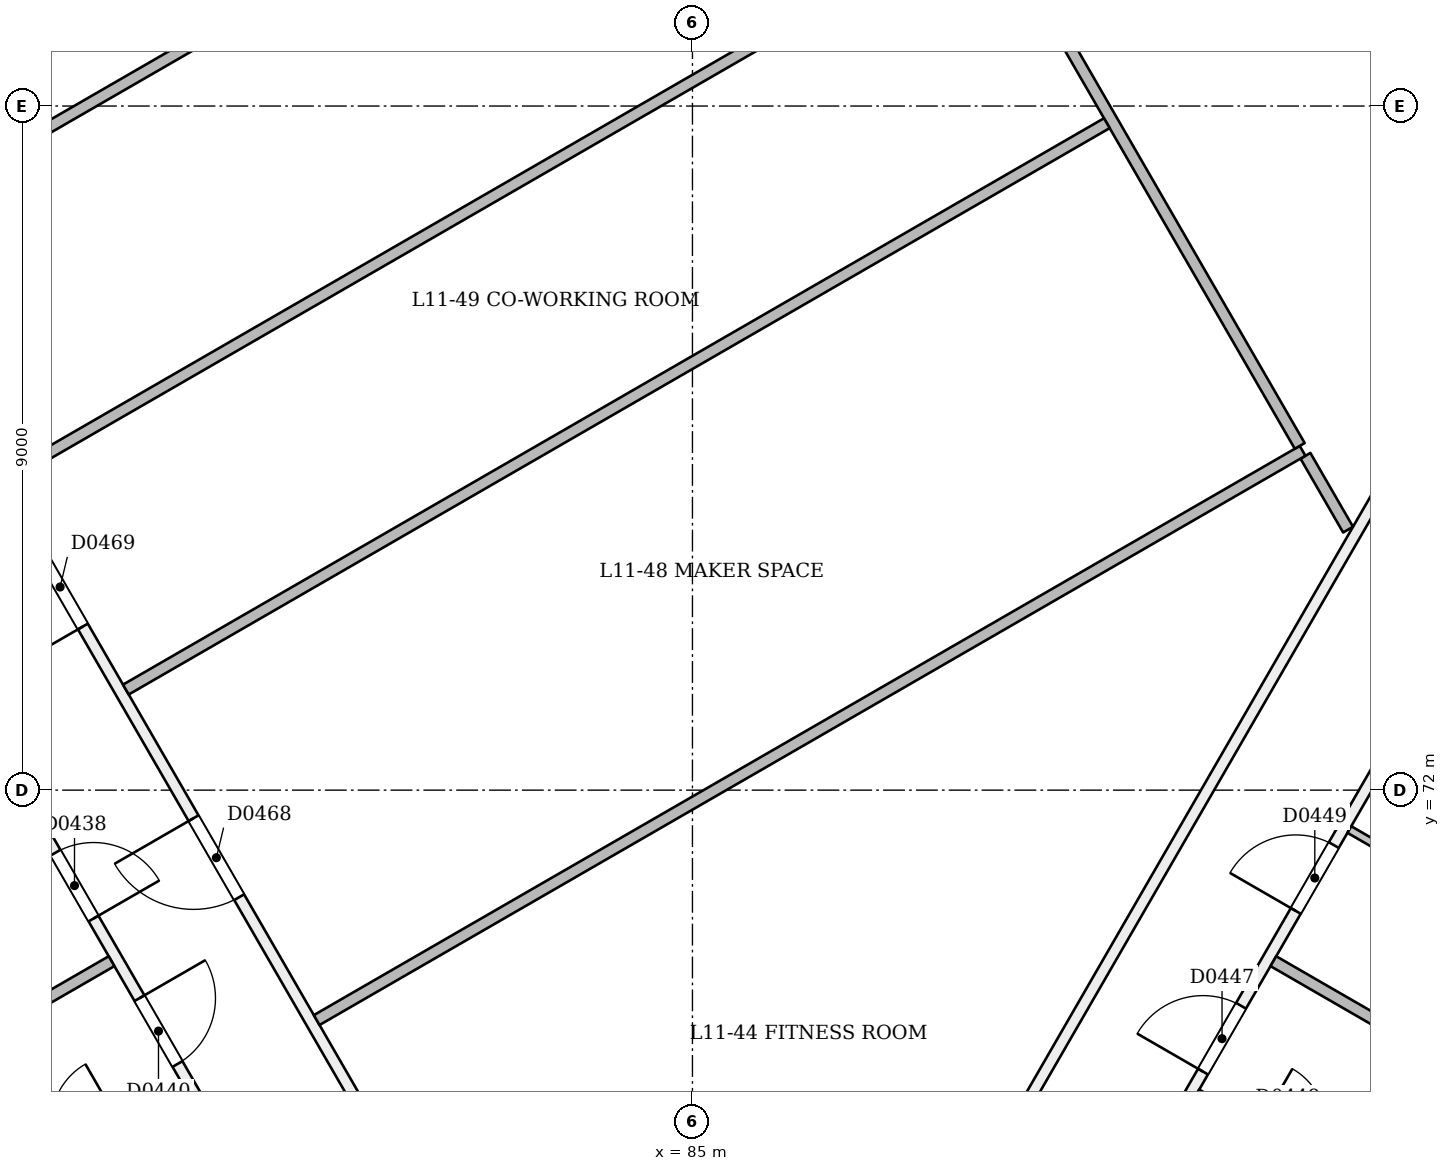
"""IFC4 building model, lengths in metres.
Left out: names, types, materials, properties, quantities, classifications, styles, units other than length and angle.
Written with IfcOpenShell. Run it as: python <this file> out.ifc"""

import sys

from ifc_helpers import new_model, si_unit, direction, frame, frame_2d, origin, place, context, subcontext, project, spatial, rectangle, extrude, element, fill, save


model = new_model("IFC4")
c1 = context("Model", 3, precision=1e-05, world=origin(), true_north=direction((0.0, 1.0)))
c2 = subcontext(c1, "Body", "Model", "MODEL_VIEW")
j1 = project(units=[si_unit("LENGTHUNIT", "METRE"), si_unit("PLANEANGLEUNIT", "RADIAN")], contexts=[c1])
p1 = place(None, origin())
s1 = spatial("IfcSite", under=j1, at=p1, CompositionType="ELEMENT")
p2 = place(p1, origin())
s2 = spatial("IfcBuilding", under=s1, at=p2, CompositionType="ELEMENT")
p3 = place(p2, frame((0.0, 0.0, 48.6)))
s3 = spatial("IfcBuildingStorey", under=s2, at=p3, CompositionType="ELEMENT", Elevation=48.6)
p4 = place(p3, frame((63.923, 93.17, 0.0), z_axis=(0.0, 0.0, 1.0), x_axis=(0.500002225217, -0.866024119051, 0.0)))
e1 = element("IfcWall", 1, at=p4, inside=s3, PredefinedType="PARTITIONING", context=c2, shape_type="SweptSolid", body=[
    extrude(rectangle(XDim=38.6, YDim=0.15, at=frame_2d((19.3, 0.0))), origin(), (0.0, 0.0, 1.0), 2.7),
])
p5 = place(p4, frame((0.605, 0.0, 0.0)))
e2 = element("IfcOpeningElement", 2, at=p5, cuts=e1, PredefinedType="OPENING", context=c2, shape_type="SweptSolid", body=[
    extrude(rectangle(XDim=1.0, YDim=2.1, at=frame_2d((0.5, 1.05))), frame((0.0, 0.085, 0.0), z_axis=(0.0, -1.0, 0.0), x_axis=(1.0, 0.0, 0.0)), (0.0, 0.0, 1.0), 0.171),
])
p6 = place(p4, frame((7.28, 0.0, 0.0)))
e3 = element("IfcOpeningElement", 3, at=p6, cuts=e1, PredefinedType="OPENING", context=c2, shape_type="SweptSolid", body=[
    extrude(rectangle(XDim=1.0, YDim=2.1, at=frame_2d((0.5, 1.05))), frame((0.0, 0.085, 0.0), z_axis=(0.0, -1.0, 0.0), x_axis=(1.0, 0.0, 0.0)), (0.0, 0.0, 1.0), 0.171),
])
p7 = place(p4, frame((9.72, 0.0, 0.0)))
e4 = element("IfcOpeningElement", 4, at=p7, cuts=e1, PredefinedType="OPENING", context=c2, shape_type="SweptSolid", body=[
    extrude(rectangle(XDim=1.0, YDim=2.1, at=frame_2d((0.5, 1.05))), frame((0.0, 0.085, 0.0), z_axis=(0.0, -1.0, 0.0), x_axis=(1.0, 0.0, 0.0)), (0.0, 0.0, 1.0), 0.171),
])
p8 = place(p4, frame((16.395, 0.0, 0.0)))
e5 = element("IfcOpeningElement", 5, at=p8, cuts=e1, PredefinedType="OPENING", context=c2, shape_type="SweptSolid", body=[
    extrude(rectangle(XDim=1.0, YDim=2.1, at=frame_2d((0.5, 1.05))), frame((0.0, 0.085, 0.0), z_axis=(0.0, -1.0, 0.0), x_axis=(1.0, 0.0, 0.0)), (0.0, 0.0, 1.0), 0.171),
])
p9 = place(p4, frame((18.72, 0.0, 0.0)))
e6 = element("IfcOpeningElement", 6, at=p9, cuts=e1, PredefinedType="OPENING", context=c2, shape_type="SweptSolid", body=[
    extrude(rectangle(XDim=1.0, YDim=2.1, at=frame_2d((0.5, 1.05))), frame((0.0, 0.085, 0.0), z_axis=(0.0, -1.0, 0.0), x_axis=(1.0, 0.0, 0.0)), (0.0, 0.0, 1.0), 0.171),
])
p10 = place(p4, frame((25.395, 0.0, 0.0)))
e7 = element("IfcOpeningElement", 7, at=p10, cuts=e1, PredefinedType="OPENING", context=c2, shape_type="SweptSolid", body=[
    extrude(rectangle(XDim=1.0, YDim=2.1, at=frame_2d((0.5, 1.05))), frame((0.0, 0.085, 0.0), z_axis=(0.0, -1.0, 0.0), x_axis=(1.0, 0.0, 0.0)), (0.0, 0.0, 1.0), 0.171),
])
p11 = place(p4, frame((27.605, 0.0, 0.0)))
e8 = element("IfcOpeningElement", 8, at=p11, cuts=e1, PredefinedType="OPENING", context=c2, shape_type="SweptSolid", body=[
    extrude(rectangle(XDim=1.0, YDim=2.1, at=frame_2d((0.5, 1.05))), frame((0.0, 0.085, 0.0), z_axis=(0.0, -1.0, 0.0), x_axis=(1.0, 0.0, 0.0)), (0.0, 0.0, 1.0), 0.171),
])
p12 = place(p4, frame((34.28, 0.0, 0.0)))
e9 = element("IfcOpeningElement", 9, at=p12, cuts=e1, PredefinedType="OPENING", context=c2, shape_type="SweptSolid", body=[
    extrude(rectangle(XDim=1.0, YDim=2.1, at=frame_2d((0.5, 1.05))), frame((0.0, 0.085, 0.0), z_axis=(0.0, -1.0, 0.0), x_axis=(1.0, 0.0, 0.0)), (0.0, 0.0, 1.0), 0.171),
])
p13 = place(p4, frame((37.342, 0.0, 0.0)))
e10 = element("IfcOpeningElement", 10, at=p13, cuts=e1, PredefinedType="OPENING", context=c2, shape_type="SweptSolid", body=[
    extrude(rectangle(XDim=1.0, YDim=2.1, at=frame_2d((0.5, 1.05))), frame((0.0, 0.085, 0.0), z_axis=(0.0, -1.0, 0.0), x_axis=(1.0, 0.0, 0.0)), (0.0, 0.0, 1.0), 0.171),
])
p14 = place(p3, frame((86.109, 58.583, 0.0), z_axis=(0.0, 0.0, 1.0), x_axis=(0.499999734377, 0.866025557142, 0.0)))
e11 = element("IfcWall", 11, at=p14, inside=s3, PredefinedType="PARTITIONING", context=c2, shape_type="SweptSolid", body=[
    extrude(rectangle(XDim=39.938, YDim=0.15, at=frame_2d((19.969, 0.0))), origin(), (0.0, 0.0, 1.0), 2.7),
])
p15 = place(p14, frame((3.619, 0.0, 0.0)))
e12 = element("IfcOpeningElement", 12, at=p15, cuts=e11, PredefinedType="OPENING", context=c2, shape_type="SweptSolid", body=[
    extrude(rectangle(XDim=1.2, YDim=2.1, at=frame_2d((0.6, 1.05))), frame((0.0, 0.085, 0.0), z_axis=(0.0, -1.0, 0.0), x_axis=(1.0, 0.0, 0.0)), (0.0, 0.0, 1.0), 0.171),
])
p16 = place(p14, frame((11.217, 0.0, 0.0)))
e13 = element("IfcOpeningElement", 13, at=p16, cuts=e11, PredefinedType="OPENING", context=c2, shape_type="SweptSolid", body=[
    extrude(rectangle(XDim=1.0, YDim=2.1, at=frame_2d((0.5, 1.05))), frame((0.0, 0.085, 0.0), z_axis=(0.0, -1.0, 0.0), x_axis=(1.0, 0.0, 0.0)), (0.0, 0.0, 1.0), 0.171),
])
p17 = place(p14, frame((13.658, 0.0, 0.0)))
e14 = element("IfcOpeningElement", 14, at=p17, cuts=e11, PredefinedType="OPENING", context=c2, shape_type="SweptSolid", body=[
    extrude(rectangle(XDim=1.0, YDim=2.1, at=frame_2d((0.5, 1.05))), frame((0.0, 0.085, 0.0), z_axis=(0.0, -1.0, 0.0), x_axis=(1.0, 0.0, 0.0)), (0.0, 0.0, 1.0), 0.171),
])
p18 = place(p14, frame((20.217, 0.0, 0.0)))
e15 = element("IfcOpeningElement", 15, at=p18, cuts=e11, PredefinedType="OPENING", context=c2, shape_type="SweptSolid", body=[
    extrude(rectangle(XDim=1.0, YDim=2.1, at=frame_2d((0.5, 1.05))), frame((0.0, 0.085, 0.0), z_axis=(0.0, -1.0, 0.0), x_axis=(1.0, 0.0, 0.0)), (0.0, 0.0, 1.0), 0.171),
])
p19 = place(p14, frame((22.658, 0.0, 0.0)))
e16 = element("IfcOpeningElement", 16, at=p19, cuts=e11, PredefinedType="OPENING", context=c2, shape_type="SweptSolid", body=[
    extrude(rectangle(XDim=1.0, YDim=2.1, at=frame_2d((0.5, 1.05))), frame((0.0, 0.085, 0.0), z_axis=(0.0, -1.0, 0.0), x_axis=(1.0, 0.0, 0.0)), (0.0, 0.0, 1.0), 0.171),
])
p20 = place(p14, frame((29.217, 0.0, 0.0)))
e17 = element("IfcOpeningElement", 17, at=p20, cuts=e11, PredefinedType="OPENING", context=c2, shape_type="SweptSolid", body=[
    extrude(rectangle(XDim=1.0, YDim=2.1, at=frame_2d((0.5, 1.05))), frame((0.0, 0.085, 0.0), z_axis=(0.0, -1.0, 0.0), x_axis=(1.0, 0.0, 0.0)), (0.0, 0.0, 1.0), 0.171),
])
p21 = place(p14, frame((31.658, 0.0, 0.0)))
e18 = element("IfcOpeningElement", 18, at=p21, cuts=e11, PredefinedType="OPENING", context=c2, shape_type="SweptSolid", body=[
    extrude(rectangle(XDim=1.0, YDim=2.1, at=frame_2d((0.5, 1.05))), frame((0.0, 0.085, 0.0), z_axis=(0.0, -1.0, 0.0), x_axis=(1.0, 0.0, 0.0)), (0.0, 0.0, 1.0), 0.171),
])
p22 = place(p14, frame((38.217, 0.0, 0.0)))
e19 = element("IfcOpeningElement", 19, at=p22, cuts=e11, PredefinedType="OPENING", context=c2, shape_type="SweptSolid", body=[
    extrude(rectangle(XDim=1.0, YDim=2.1, at=frame_2d((0.5, 1.05))), frame((0.0, 0.085, 0.0), z_axis=(0.0, -1.0, 0.0), x_axis=(1.0, 0.0, 0.0)), (0.0, 0.0, 1.0), 0.171),
])
p23 = place(p3, frame((85.0, 60.262, 0.0), z_axis=(0.0, 0.0, 1.0), x_axis=(-0.499998554739, 0.866026238205, 0.0)))
e20 = element("IfcWall", 20, at=p23, inside=s3, PredefinedType="PARTITIONING", context=c2, shape_type="SweptSolid", body=[
    extrude(rectangle(XDim=35.031, YDim=0.15, at=frame_2d((17.515, 0.0))), origin(), (0.0, 0.0, 1.0), 3.1),
])
p24 = place(p23, frame((6.026, 0.0, 0.0)))
e21 = element("IfcOpeningElement", 21, at=p24, cuts=e20, PredefinedType="OPENING", context=c2, shape_type="SweptSolid", body=[
    extrude(rectangle(XDim=1.2, YDim=2.1, at=frame_2d((0.6, 1.05))), frame((0.0, 0.085, 0.0), z_axis=(0.0, -1.0, 0.0), x_axis=(1.0, 0.0, 0.0)), (0.0, 0.0, 1.0), 0.171),
])
p25 = place(p23, frame((19.295, 0.0, 0.0)))
e22 = element("IfcOpeningElement", 22, at=p25, cuts=e20, PredefinedType="OPENING", context=c2, shape_type="SweptSolid", body=[
    extrude(rectangle(XDim=1.2, YDim=2.1, at=frame_2d((0.6, 1.05))), frame((0.0, 0.085, 0.0), z_axis=(0.0, -1.0, 0.0), x_axis=(1.0, 0.0, 0.0)), (0.0, 0.0, 1.0), 0.171),
])
p26 = place(p23, frame((28.126, 0.0, 0.0)))
e23 = element("IfcOpeningElement", 23, at=p26, cuts=e20, PredefinedType="OPENING", context=c2, shape_type="SweptSolid", body=[
    extrude(rectangle(XDim=1.2, YDim=2.1, at=frame_2d((0.6, 1.05))), frame((0.0, 0.085, 0.0), z_axis=(0.0, -1.0, 0.0), x_axis=(1.0, 0.0, 0.0)), (0.0, 0.0, 1.0), 0.171),
])
p27 = place(p23, frame((11.927, 0.0, 0.0)))
e24 = element("IfcOpeningElement", 24, at=p27, cuts=e20, PredefinedType="OPENING", context=c2, shape_type="SweptSolid", body=[
    extrude(rectangle(XDim=1.2, YDim=2.1, at=frame_2d((0.6, 1.05))), frame((0.0, 0.085, 0.0), z_axis=(0.0, -1.0, 0.0), x_axis=(1.0, 0.0, 0.0)), (0.0, 0.0, 1.0), 0.171),
])
p28 = place(p23, frame((16.039, 0.0, 0.0)))
e25 = element("IfcOpeningElement", 25, at=p28, cuts=e20, PredefinedType="OPENING", context=c2, shape_type="SweptSolid", body=[
    extrude(rectangle(XDim=1.2, YDim=2.1, at=frame_2d((0.6, 1.05))), frame((0.0, 0.085, 0.0), z_axis=(0.0, -1.0, 0.0), x_axis=(1.0, 0.0, 0.0)), (0.0, 0.0, 1.0), 0.171),
])
p29 = place(p23, frame((23.133, 0.0, 0.0)))
e26 = element("IfcOpeningElement", 26, at=p29, cuts=e20, PredefinedType="OPENING", context=c2, shape_type="SweptSolid", body=[
    extrude(rectangle(XDim=1.0, YDim=2.1, at=frame_2d((0.5, 1.05))), frame((0.0, 0.085, 0.0), z_axis=(0.0, -1.0, 0.0), x_axis=(1.0, 0.0, 0.0)), (0.0, 0.0, 1.0), 0.171),
])
p30 = place(p3, frame((102.515, 90.6, 0.0), z_axis=(0.0, 0.0, 1.0), x_axis=(-0.499999380783, -0.866025761289, 0.0)))
e27 = element("IfcWall", 27, at=p30, inside=s3, PredefinedType="PARTITIONING", context=c2, shape_type="SweptSolid", body=[
    extrude(rectangle(XDim=34.901, YDim=0.15, at=frame_2d((17.45, 0.0))), origin(), (0.0, 0.0, 1.0), 3.1),
])
p31 = place(p30, frame((9.207, 0.0, 0.0)))
e28 = element("IfcOpeningElement", 28, at=p31, cuts=e27, PredefinedType="OPENING", context=c2, shape_type="SweptSolid", body=[
    extrude(rectangle(XDim=1.2, YDim=2.1, at=frame_2d((0.6, 1.05))), frame((0.0, 0.085, 0.0), z_axis=(0.0, -1.0, 0.0), x_axis=(1.0, 0.0, 0.0)), (0.0, 0.0, 1.0), 0.171),
])
p32 = place(p3, frame((71.863, 66.577, 0.0), z_axis=(0.0, 0.0, 1.0), x_axis=(0.866025401434, 0.500000004071, 0.0)))
e29 = element("IfcWall", 29, at=p32, inside=s3, PredefinedType="PARTITIONING", context=c2, shape_type="SweptSolid", body=[
    extrude(rectangle(XDim=6.345, YDim=0.15, at=frame_2d((3.173, 0.0))), origin(), (0.0, 0.0, 1.0), 2.6),
])
p33 = place(p3, frame((75.774, 66.642, 0.0), z_axis=(0.0, 0.0, 1.0), x_axis=(0.866046596414, 0.499963291492, 0.0)))
e30 = element("IfcWall", 30, at=p33, inside=s3, PredefinedType="PARTITIONING", context=c2, shape_type="SweptSolid", body=[
    extrude(rectangle(XDim=2.925, YDim=0.1, at=frame_2d((1.462, 0.0))), origin(), (0.0, 0.0, 1.0), 3.1),
])
p34 = place(p33, frame((1.05, 0.0, 0.0)))
e31 = element("IfcOpeningElement", 31, at=p34, cuts=e30, PredefinedType="OPENING", context=c2, shape_type="SweptSolid", body=[
    extrude(rectangle(XDim=0.9, YDim=2.1, at=frame_2d((0.45, 1.05))), frame((0.0, 0.061, 0.0), z_axis=(0.0, -1.0, 0.0), x_axis=(1.0, 0.0, 0.0)), (0.0, 0.0, 1.0), 0.121),
])
p35 = place(p3, frame((91.642, 68.018, 0.0), z_axis=(0.0, 0.0, 1.0), x_axis=(0.866011447264, -0.500024172624, 0.0)))
e32 = element("IfcWall", 32, at=p35, inside=s3, PredefinedType="PARTITIONING", context=c2, shape_type="SweptSolid", body=[
    extrude(rectangle(XDim=2.825, YDim=0.1, at=frame_2d((1.413, 0.0))), origin(), (0.0, 0.0, 1.0), 3.1),
])
p36 = place(p35, frame((0.925, 0.0, 0.0)))
e33 = element("IfcOpeningElement", 33, at=p36, cuts=e32, PredefinedType="OPENING", context=c2, shape_type="SweptSolid", body=[
    extrude(rectangle(XDim=0.9, YDim=2.1, at=frame_2d((0.45, 1.05))), frame((0.0, 0.061, 0.0), z_axis=(0.0, -1.0, 0.0), x_axis=(1.0, 0.0, 0.0)), (0.0, 0.0, 1.0), 0.121),
])
p37 = place(p3, frame((98.137, 66.577, 0.0), z_axis=(0.0, 0.0, 1.0), x_axis=(-0.866025401434, 0.500000004071, 0.0)))
e34 = element("IfcWall", 34, at=p37, inside=s3, PredefinedType="PARTITIONING", context=c2, shape_type="SweptSolid", body=[
    extrude(rectangle(XDim=6.345, YDim=0.15, at=frame_2d((3.173, 0.0))), origin(), (0.0, 0.0, 1.0), 2.6),
])
p38 = place(p3, frame((96.089, 70.069, 0.0), z_axis=(0.0, 0.0, 1.0), x_axis=(-0.866011447264, 0.500024172624, 0.0)))
e35 = element("IfcWall", 35, at=p38, inside=s3, PredefinedType="PARTITIONING", context=c2, shape_type="SweptSolid", body=[
    extrude(rectangle(XDim=2.825, YDim=0.1, at=frame_2d((1.413, 0.0))), origin(), (0.0, 0.0, 1.0), 3.1),
])
p39 = place(p3, frame((93.625, 75.427, 0.0), z_axis=(0.0, 0.0, 1.0), x_axis=(-0.499954826904, 0.866051482913, 0.0)))
e36 = element("IfcWall", 36, at=p39, inside=s3, PredefinedType="PARTITIONING", context=c2, shape_type="SweptSolid", body=[
    extrude(rectangle(XDim=1.122, YDim=0.15, at=frame_2d((0.561, 0.0))), origin(), (0.0, 0.0, 1.0), 3.1),
])
p40 = place(p3, frame((93.027, 76.464, 0.0), z_axis=(0.0, 0.0, 1.0), x_axis=(-0.866028686662, -0.499994313846, 0.0)))
e37 = element("IfcWall", 37, at=p40, inside=s3, PredefinedType="PARTITIONING", context=c2, shape_type="SweptSolid", body=[
    extrude(rectangle(XDim=14.977, YDim=0.15, at=frame_2d((7.489, 0.0))), origin(), (0.0, 0.0, 1.0), 3.1),
])
p41 = place(p3, frame((75.945, 76.097, 0.0), z_axis=(0.0, 0.0, 1.0), x_axis=(0.866026931326, 0.499997354212, 0.0)))
e38 = element("IfcWall", 38, at=p41, inside=s3, PredefinedType="PARTITIONING", context=c2, shape_type="SweptSolid", body=[
    extrude(rectangle(XDim=28.726, YDim=0.15, at=frame_2d((14.363, 0.0))), origin(), (0.0, 0.0, 1.0), 3.1),
])
p42 = place(p3, frame((82.0, 83.879, 0.0), z_axis=(0.0, 0.0, 1.0), x_axis=(-0.866037386495, -0.499979244763, 0.0)))
e39 = element("IfcWall", 39, at=p42, inside=s3, PredefinedType="PARTITIONING", context=c2, shape_type="SweptSolid", body=[
    extrude(rectangle(XDim=9.135, YDim=0.15, at=frame_2d((4.568, 0.0))), origin(), (0.0, 0.0, 1.0), 3.1),
])
p43 = place(p3, frame((88.953, 83.521, 0.0), z_axis=(0.0, 0.0, 1.0), x_axis=(0.499983344799, -0.866035019456, 0.0)))
e40 = element("IfcWall", 40, at=p43, inside=s3, PredefinedType="PARTITIONING", context=c2, shape_type="SweptSolid", body=[
    extrude(rectangle(XDim=8.073, YDim=0.15, at=frame_2d((4.037, 0.0))), origin(), (0.0, 0.0, 1.0), 3.1),
])
p44 = place(p3, frame((90.452, 80.774, 0.0), z_axis=(0.0, 0.0, 1.0), x_axis=(-0.866020527158, -0.50000844647, 0.0)))
e41 = element("IfcWall", 41, at=p44, inside=s3, PredefinedType="PARTITIONING", context=c2, shape_type="SweptSolid", body=[
    extrude(rectangle(XDim=14.902, YDim=0.15, at=frame_2d((7.451, 0.0))), origin(), (0.0, 0.0, 1.0), 3.1),
])
p45 = place(p10, origin())
e42 = element("IfcDoor", 42, at=p45, inside=s3, OperationType="SINGLE_SWING_RIGHT", PredefinedType="NOTDEFINED", context=c2, shape_type="SweptSolid", body=[
    extrude(rectangle(XDim=1.0, YDim=2.1, at=frame_2d((0.5, 1.05))), frame((0.0, 0.025, 0.0), z_axis=(0.0, -1.0, 0.0), x_axis=(1.0, 0.0, 0.0)), (0.0, 0.0, 1.0), 0.05),
])
fill(e7, e42)
p46 = place(p11, origin())
e43 = element("IfcDoor", 43, at=p46, inside=s3, OperationType="SINGLE_SWING_LEFT", PredefinedType="NOTDEFINED", context=c2, shape_type="SweptSolid", body=[
    extrude(rectangle(XDim=1.0, YDim=2.1, at=frame_2d((0.5, 1.05))), frame((0.0, 0.025, 0.0), z_axis=(0.0, -1.0, 0.0), x_axis=(1.0, 0.0, 0.0)), (0.0, 0.0, 1.0), 0.05),
])
fill(e8, e43)
p47 = place(p16, origin())
e44 = element("IfcDoor", 44, at=p47, inside=s3, OperationType="SINGLE_SWING_LEFT", PredefinedType="NOTDEFINED", context=c2, shape_type="SweptSolid", body=[
    extrude(rectangle(XDim=1.0, YDim=2.1, at=frame_2d((0.5, 1.05))), frame((0.0, 0.025, 0.0), z_axis=(0.0, -1.0, 0.0), x_axis=(1.0, 0.0, 0.0)), (0.0, 0.0, 1.0), 0.05),
])
fill(e13, e44)
p48 = place(p17, origin())
e45 = element("IfcDoor", 45, at=p48, inside=s3, OperationType="SINGLE_SWING_LEFT", PredefinedType="NOTDEFINED", context=c2, shape_type="SweptSolid", body=[
    extrude(rectangle(XDim=1.0, YDim=2.1, at=frame_2d((0.5, 1.05))), frame((0.0, 0.025, 0.0), z_axis=(0.0, -1.0, 0.0), x_axis=(1.0, 0.0, 0.0)), (0.0, 0.0, 1.0), 0.05),
])
fill(e14, e45)
p49 = place(p27, origin())
e46 = element("IfcDoor", 46, at=p49, inside=s3, OperationType="SINGLE_SWING_RIGHT", PredefinedType="NOTDEFINED", context=c2, shape_type="SweptSolid", body=[
    extrude(rectangle(XDim=1.2, YDim=2.1, at=frame_2d((0.6, 1.05))), frame((0.0, 0.025, 0.0), z_axis=(0.0, -1.0, 0.0), x_axis=(1.0, 0.0, 0.0)), (0.0, 0.0, 1.0), 0.05),
])
fill(e24, e46)
p50 = place(p28, origin())
e47 = element("IfcDoor", 47, at=p50, inside=s3, OperationType="SINGLE_SWING_LEFT", PredefinedType="NOTDEFINED", context=c2, shape_type="SweptSolid", body=[
    extrude(rectangle(XDim=1.2, YDim=2.1, at=frame_2d((0.6, 1.05))), frame((0.0, 0.025, 0.0), z_axis=(0.0, -1.0, 0.0), x_axis=(1.0, 0.0, 0.0)), (0.0, 0.0, 1.0), 0.05),
])
fill(e25, e47)
save(model, sys.argv[1])
